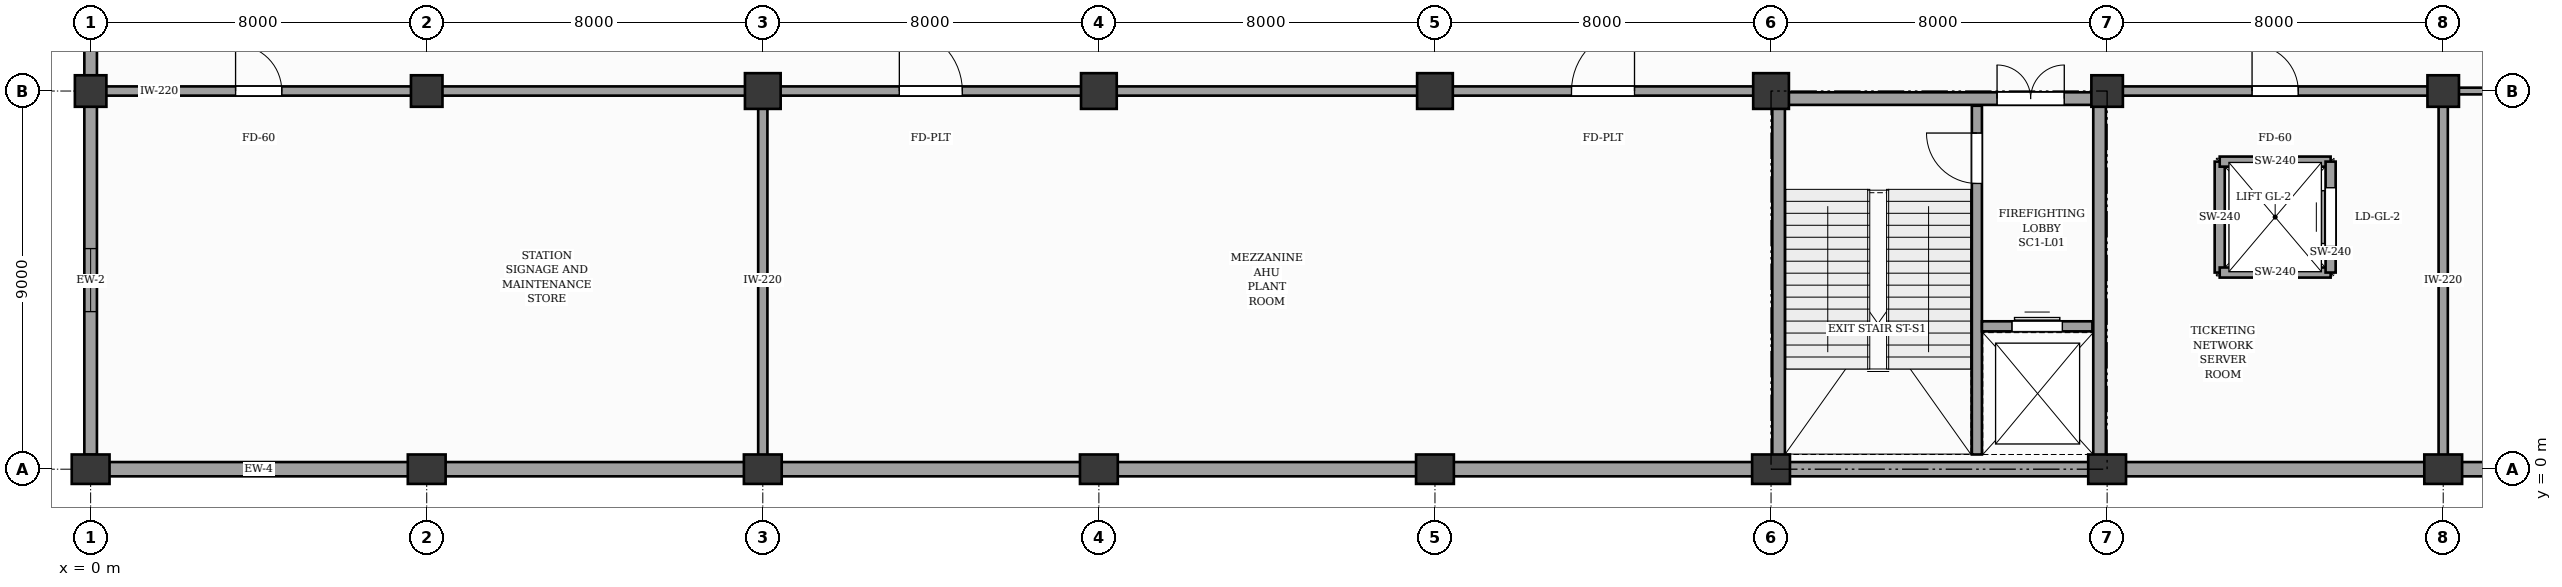
"""IFC4 building model, lengths in metres.
Left out: names, types, materials, properties, quantities, classifications, styles, units other than length and angle.
Written with IfcOpenShell. Run it as: python <this file> out.ifc"""

import sys

from ifc_helpers import new_model, si_unit, direction, frame, frame_2d, origin, origin_with_axes, origin_2d, place, context, subcontext, project, spatial, rectangle, extrude, element, fill, save


model = new_model("IFC4")
c1 = context("Model", 3, precision=1e-05, world=origin(), true_north=direction((0.0, 1.0)))
c2 = subcontext(c1, "Body", "Model", "MODEL_VIEW")
j1 = project(units=[si_unit("LENGTHUNIT", "METRE"), si_unit("PLANEANGLEUNIT", "RADIAN")], contexts=[c1])
p1 = place(None, origin())
s1 = spatial("IfcSite", under=j1, at=p1, CompositionType="ELEMENT")
p2 = place(p1, origin())
s2 = spatial("IfcBuilding", under=s1, at=p2, CompositionType="ELEMENT")
p3 = place(p2, frame((0.0, 0.0, 4.8)))
s3 = spatial("IfcBuildingStorey", under=s2, at=p3, CompositionType="ELEMENT", Elevation=4.8)
p4 = place(p3, origin_with_axes())
e1 = element("IfcColumn", 1, at=p4, inside=s3, PredefinedType="PILASTER", context=c2, shape_type="SweptSolid", body=[
    extrude(rectangle(XDim=0.9, YDim=0.7, at=origin_2d()), origin(), (0.0, 0.0, 1.0), 4.8),
])
p5 = place(p3, frame((0.0, 9.0, 0.0), z_axis=(0.0, 0.0, 1.0), x_axis=(1.0, 0.0, 0.0)))
e2 = element("IfcColumn", 2, at=p5, inside=s3, PredefinedType="COLUMN", context=c2, shape_type="SweptSolid", body=[
    extrude(rectangle(XDim=0.75, YDim=0.75, at=origin_2d()), origin(), (0.0, 0.0, 1.0), 4.8),
])
p6 = place(p3, frame((8.0, 0.0, 0.0), z_axis=(0.0, 0.0, 1.0), x_axis=(1.0, 0.0, 0.0)))
e3 = element("IfcColumn", 3, at=p6, inside=s3, PredefinedType="PILASTER", context=c2, shape_type="SweptSolid", body=[
    extrude(rectangle(XDim=0.9, YDim=0.7, at=origin_2d()), origin(), (0.0, 0.0, 1.0), 4.8),
])
p7 = place(p3, frame((8.0, 9.0, 0.0), z_axis=(0.0, 0.0, 1.0), x_axis=(1.0, 0.0, 0.0)))
e4 = element("IfcColumn", 4, at=p7, inside=s3, PredefinedType="COLUMN", context=c2, shape_type="SweptSolid", body=[
    extrude(rectangle(XDim=0.75, YDim=0.75, at=origin_2d()), origin(), (0.0, 0.0, 1.0), 4.8),
])
p8 = place(p3, frame((16.0, 0.0, 0.0), z_axis=(0.0, 0.0, 1.0), x_axis=(1.0, 0.0, 0.0)))
e5 = element("IfcColumn", 5, at=p8, inside=s3, PredefinedType="PILASTER", context=c2, shape_type="SweptSolid", body=[
    extrude(rectangle(XDim=0.9, YDim=0.7, at=origin_2d()), origin(), (0.0, 0.0, 1.0), 4.8),
])
p9 = place(p3, frame((16.0, 9.0, 0.0), z_axis=(0.0, 0.0, 1.0), x_axis=(1.0, 0.0, 0.0)))
e6 = element("IfcColumn", 6, at=p9, inside=s3, PredefinedType="COLUMN", context=c2, shape_type="SweptSolid", body=[
    extrude(rectangle(XDim=0.85, YDim=0.85, at=origin_2d()), origin(), (0.0, 0.0, 1.0), 4.8),
])
p10 = place(p3, frame((24.0, 0.0, 0.0), z_axis=(0.0, 0.0, 1.0), x_axis=(1.0, 0.0, 0.0)))
e7 = element("IfcColumn", 7, at=p10, inside=s3, PredefinedType="PILASTER", context=c2, shape_type="SweptSolid", body=[
    extrude(rectangle(XDim=0.9, YDim=0.7, at=origin_2d()), origin(), (0.0, 0.0, 1.0), 4.8),
])
p11 = place(p3, frame((24.0, 9.0, 0.0), z_axis=(0.0, 0.0, 1.0), x_axis=(1.0, 0.0, 0.0)))
e8 = element("IfcColumn", 8, at=p11, inside=s3, PredefinedType="COLUMN", context=c2, shape_type="SweptSolid", body=[
    extrude(rectangle(XDim=0.85, YDim=0.85, at=origin_2d()), origin(), (0.0, 0.0, 1.0), 4.8),
])
p12 = place(p3, frame((32.0, 0.0, 0.0), z_axis=(0.0, 0.0, 1.0), x_axis=(1.0, 0.0, 0.0)))
e9 = element("IfcColumn", 9, at=p12, inside=s3, PredefinedType="PILASTER", context=c2, shape_type="SweptSolid", body=[
    extrude(rectangle(XDim=0.9, YDim=0.7, at=origin_2d()), origin(), (0.0, 0.0, 1.0), 4.8),
])
p13 = place(p3, frame((32.0, 9.0, 0.0), z_axis=(0.0, 0.0, 1.0), x_axis=(1.0, 0.0, 0.0)))
e10 = element("IfcColumn", 10, at=p13, inside=s3, PredefinedType="COLUMN", context=c2, shape_type="SweptSolid", body=[
    extrude(rectangle(XDim=0.85, YDim=0.85, at=origin_2d()), origin(), (0.0, 0.0, 1.0), 4.8),
])
p14 = place(p3, frame((40.0, 0.0, 0.0), z_axis=(0.0, 0.0, 1.0), x_axis=(1.0, 0.0, 0.0)))
e11 = element("IfcColumn", 11, at=p14, inside=s3, PredefinedType="PILASTER", context=c2, shape_type="SweptSolid", body=[
    extrude(rectangle(XDim=0.9, YDim=0.7, at=origin_2d()), origin(), (0.0, 0.0, 1.0), 4.8),
])
p15 = place(p3, frame((40.0, 9.0, 0.0), z_axis=(0.0, 0.0, 1.0), x_axis=(1.0, 0.0, 0.0)))
e12 = element("IfcColumn", 12, at=p15, inside=s3, PredefinedType="COLUMN", context=c2, shape_type="SweptSolid", body=[
    extrude(rectangle(XDim=0.85, YDim=0.85, at=origin_2d()), origin(), (0.0, 0.0, 1.0), 4.8),
])
p16 = place(p3, frame((48.0, 0.0, 0.0), z_axis=(0.0, 0.0, 1.0), x_axis=(1.0, 0.0, 0.0)))
e13 = element("IfcColumn", 13, at=p16, inside=s3, PredefinedType="PILASTER", context=c2, shape_type="SweptSolid", body=[
    extrude(rectangle(XDim=0.9, YDim=0.7, at=origin_2d()), origin(), (0.0, 0.0, 1.0), 4.8),
])
p17 = place(p3, frame((48.0, 9.0, 0.0), z_axis=(0.0, 0.0, 1.0), x_axis=(1.0, 0.0, 0.0)))
e14 = element("IfcColumn", 14, at=p17, inside=s3, PredefinedType="COLUMN", context=c2, shape_type="SweptSolid", body=[
    extrude(rectangle(XDim=0.75, YDim=0.75, at=origin_2d()), origin(), (0.0, 0.0, 1.0), 4.8),
])
p18 = place(p3, frame((56.0, 0.0, 0.0), z_axis=(0.0, 0.0, 1.0), x_axis=(1.0, 0.0, 0.0)))
e15 = element("IfcColumn", 15, at=p18, inside=s3, PredefinedType="PILASTER", context=c2, shape_type="SweptSolid", body=[
    extrude(rectangle(XDim=0.9, YDim=0.7, at=origin_2d()), origin(), (0.0, 0.0, 1.0), 4.8),
])
p19 = place(p3, frame((56.0, 9.0, 0.0), z_axis=(0.0, 0.0, 1.0), x_axis=(1.0, 0.0, 0.0)))
e16 = element("IfcColumn", 16, at=p19, inside=s3, PredefinedType="COLUMN", context=c2, shape_type="SweptSolid", body=[
    extrude(rectangle(XDim=0.75, YDim=0.75, at=origin_2d()), origin(), (0.0, 0.0, 1.0), 4.8),
])
for number, where, z_axis, x_axis in (
    (17, (0.4, 0.0, 0.0), (0.0, 0.0, 1.0), (1.0, 0.0, 0.0)),
    (18, (8.4, 0.0, 0.0), (0.0, 0.0, 1.0), (1.0, 0.0, 0.0)),
    (19, (16.4, 0.0, 0.0), (0.0, 0.0, 1.0), (1.0, 0.0, 0.0)),
    (20, (24.4, 0.0, 0.0), (0.0, 0.0, 1.0), (1.0, 0.0, 0.0)),
    (21, (32.4, 0.0, 0.0), (0.0, 0.0, 1.0), (1.0, 0.0, 0.0)),
    (22, (40.4, 0.0, 0.0), (0.0, 0.0, 1.0), (1.0, 0.0, 0.0)),
    (23, (48.4, 0.0, 0.0), (0.0, 0.0, 1.0), (1.0, 0.0, 0.0)),
):
    element("IfcWall", number, at=place(p3, frame(where, z_axis=z_axis, x_axis=x_axis)), inside=s3, PredefinedType="SOLIDWALL", context=c2, shape_type="SweptSolid", body=[
        extrude(rectangle(XDim=7.2, YDim=0.34, at=frame_2d((3.6, 0.0))), origin(), (0.0, 0.0, 1.0), 3.84),
    ])
p20 = place(p3, frame((56.4, 0.0, 0.0), z_axis=(0.0, 0.0, 1.0), x_axis=(1.0, 0.0, 0.0)))
e24 = element("IfcWall", 24, at=p20, inside=s3, PredefinedType="SOLIDWALL", context=c2, shape_type="SweptSolid", body=[
    extrude(rectangle(XDim=7.2, YDim=0.34, at=frame_2d((3.6, 0.0))), origin(), (0.0, 0.0, 1.0), 3.08),
])
p21 = place(p3, frame((0.0, 0.345, 0.0), z_axis=(0.0, 0.0, 1.0), x_axis=(0.0, 1.0, 0.0)))
e25 = element("IfcWall", 25, at=p21, inside=s3, PredefinedType="SOLIDWALL", context=c2, shape_type="SweptSolid", body=[
    extrude(rectangle(XDim=8.285, YDim=0.3, at=frame_2d((4.143, 0.0))), origin(), (0.0, 0.0, 1.0), 3.66),
])
p22 = place(p21, frame((3.405, 0.0, 0.95)))
e26 = element("IfcOpeningElement", 26, at=p22, cuts=e25, PredefinedType="OPENING", context=c2, shape_type="SweptSolid", body=[
    extrude(rectangle(XDim=1.5, YDim=1.9, at=frame_2d((0.75, 0.95))), frame((0.0, 0.16, 0.0), z_axis=(0.0, -1.0, 0.0), x_axis=(1.0, 0.0, 0.0)), (0.0, 0.0, 1.0), 0.32),
])
p23 = place(p3, frame((0.0, 9.37, 0.0), z_axis=(0.0, 0.0, 1.0), x_axis=(0.0, 1.0, 0.0)))
e27 = element("IfcWall", 27, at=p23, inside=s3, PredefinedType="SOLIDWALL", context=c2, shape_type="SweptSolid", body=[
    extrude(rectangle(XDim=8.26, YDim=0.3, at=frame_2d((4.13, 0.0))), origin(), (0.0, 0.0, 1.0), 3.66),
])
p24 = place(p23, frame((3.38, 0.0, 0.95)))
e28 = element("IfcOpeningElement", 28, at=p24, cuts=e27, PredefinedType="OPENING", context=c2, shape_type="SweptSolid", body=[
    extrude(rectangle(XDim=1.5, YDim=1.9, at=frame_2d((0.75, 0.95))), frame((0.0, 0.16, 0.0), z_axis=(0.0, -1.0, 0.0), x_axis=(1.0, 0.0, 0.0)), (0.0, 0.0, 1.0), 0.32),
])
p25 = place(p3, frame((44.9, 0.35, 0.0), z_axis=(0.0, 0.0, 1.0), x_axis=(0.0, 1.0, 0.0)))
e29 = element("IfcWall", 29, at=p25, inside=s3, PredefinedType="SHEAR", context=c2, shape_type="SweptSolid", body=[
    extrude(rectangle(XDim=8.3, YDim=0.24, at=frame_2d((4.15, 0.0))), origin(), (0.0, 0.0, 1.0), 4.52),
])
p26 = place(p25, frame((6.45, 0.0, 0.0)))
e30 = element("IfcOpeningElement", 30, at=p26, cuts=e29, PredefinedType="OPENING", context=c2, shape_type="SweptSolid", body=[
    extrude(rectangle(XDim=1.2, YDim=2.15, at=frame_2d((0.6, 1.075))), frame((0.0, 0.13, 0.0), z_axis=(0.0, -1.0, 0.0), x_axis=(1.0, 0.0, 0.0)), (0.0, 0.0, 1.0), 0.26),
])
p27 = place(p3, frame((45.02, 3.4, 0.0), z_axis=(0.0, 0.0, 1.0), x_axis=(1.0, 0.0, 0.0)))
e31 = element("IfcWall", 31, at=p27, inside=s3, PredefinedType="SHEAR", context=c2, shape_type="SweptSolid", body=[
    extrude(rectangle(XDim=2.63, YDim=0.24, at=frame_2d((1.315, 0.0))), origin(), (0.0, 0.0, 1.0), 4.52),
])
p28 = place(p27, frame((0.715, 0.0, 0.0)))
e32 = element("IfcOpeningElement", 32, at=p28, cuts=e31, PredefinedType="OPENING", context=c2, shape_type="SweptSolid", body=[
    extrude(rectangle(XDim=1.2, YDim=2.15, at=frame_2d((0.6, 1.075))), frame((0.0, 0.13, 0.0), z_axis=(0.0, -1.0, 0.0), x_axis=(1.0, 0.0, 0.0)), (0.0, 0.0, 1.0), 0.26),
])
for number, where, z_axis, x_axis in (
    (33, (40.18, 0.18, 0.0), (0.0, 0.0, 1.0), (0.0, 1.0, 0.0)),
    (34, (47.82, 0.18, 0.0), (0.0, 0.0, 1.0), (0.0, 1.0, 0.0)),
):
    element("IfcWall", number, at=place(p3, frame(where, z_axis=z_axis, x_axis=x_axis)), inside=s3, PredefinedType="SHEAR", context=c2, shape_type="SweptSolid", body=[
        extrude(rectangle(XDim=8.64, YDim=0.3, at=frame_2d((4.32, 0.0))), origin(), (0.0, 0.0, 1.0), 4.52),
    ])
p29 = place(p3, frame((40.03, 8.82, 0.0), z_axis=(0.0, 0.0, 1.0), x_axis=(1.0, 0.0, 0.0)))
e35 = element("IfcWall", 35, at=p29, inside=s3, PredefinedType="SHEAR", context=c2, shape_type="SweptSolid", body=[
    extrude(rectangle(XDim=7.94, YDim=0.3, at=frame_2d((3.97, 0.0))), origin(), (0.0, 0.0, 1.0), 4.52),
])
p30 = place(p29, frame((5.35, 0.0, 0.0)))
e36 = element("IfcOpeningElement", 36, at=p30, cuts=e35, PredefinedType="OPENING", context=c2, shape_type="SweptSolid", body=[
    extrude(rectangle(XDim=1.6, YDim=2.15, at=frame_2d((0.8, 1.075))), frame((0.0, 0.16, 0.0), z_axis=(0.0, -1.0, 0.0), x_axis=(1.0, 0.0, 0.0)), (0.0, 0.0, 1.0), 0.32),
])
for number, where, z_axis, x_axis in (
    (37, (50.68, 4.68, 0.0), (0.0, 0.0, 1.0), (0.0, 1.0, 0.0)),
    (38, (50.68, 4.68, 0.0), (0.0, 0.0, 1.0), (1.0, 0.0, 0.0)),
    (39, (50.68, 7.32, 0.0), (0.0, 0.0, 1.0), (1.0, 0.0, 0.0)),
):
    element("IfcWall", number, at=place(p3, frame(where, z_axis=z_axis, x_axis=x_axis)), inside=s3, PredefinedType="SHEAR", context=c2, shape_type="SweptSolid", body=[
        extrude(rectangle(XDim=2.64, YDim=0.24, at=frame_2d((1.32, 0.0))), origin(), (0.0, 0.0, 1.0), 4.55),
    ])
p31 = place(p3, frame((53.32, 4.68, 0.0), z_axis=(0.0, 0.0, 1.0), x_axis=(0.0, 1.0, 0.0)))
e40 = element("IfcWall", 40, at=p31, inside=s3, PredefinedType="SHEAR", context=c2, shape_type="SweptSolid", body=[
    extrude(rectangle(XDim=2.64, YDim=0.24, at=frame_2d((1.32, 0.0))), origin(), (0.0, 0.0, 1.0), 4.55),
])
p32 = place(p31, frame((0.62, 0.0, 0.0)))
e41 = element("IfcOpeningElement", 41, at=p32, cuts=e40, PredefinedType="OPENING", context=c2, shape_type="SweptSolid", body=[
    extrude(rectangle(XDim=1.4, YDim=2.15, at=frame_2d((0.7, 1.075))), frame((0.0, 0.13, 0.0), z_axis=(0.0, -1.0, 0.0), x_axis=(1.0, 0.0, 0.0)), (0.0, 0.0, 1.0), 0.26),
])
p33 = place(p3, frame((0.3, 9.0, 0.0), z_axis=(0.0, 0.0, 1.0), x_axis=(1.0, 0.0, 0.0)))
e42 = element("IfcWall", 42, at=p33, inside=s3, PredefinedType="SOLIDWALL", context=c2, shape_type="SweptSolid", body=[
    extrude(rectangle(XDim=7.4, YDim=0.22, at=frame_2d((3.7, 0.0))), origin(), (0.0, 0.0, 1.0), 3.66),
])
p34 = place(p33, frame((3.15, 0.0, 0.0)))
e43 = element("IfcOpeningElement", 43, at=p34, cuts=e42, PredefinedType="OPENING", context=c2, shape_type="SweptSolid", body=[
    extrude(rectangle(XDim=1.1, YDim=2.15, at=frame_2d((0.55, 1.075))), frame((0.0, 0.12, 0.0), z_axis=(0.0, -1.0, 0.0), x_axis=(1.0, 0.0, 0.0)), (0.0, 0.0, 1.0), 0.24),
])
p35 = place(p3, frame((8.3, 9.0, 0.0), z_axis=(0.0, 0.0, 1.0), x_axis=(1.0, 0.0, 0.0)))
e44 = element("IfcWall", 44, at=p35, inside=s3, PredefinedType="SOLIDWALL", context=c2, shape_type="SweptSolid", body=[
    extrude(rectangle(XDim=7.4, YDim=0.22, at=frame_2d((3.7, 0.0))), origin(), (0.0, 0.0, 1.0), 3.66),
])
p36 = place(p3, frame((16.0, 0.3, 0.0), z_axis=(0.0, 0.0, 1.0), x_axis=(0.0, 1.0, 0.0)))
e45 = element("IfcWall", 45, at=p36, inside=s3, PredefinedType="SOLIDWALL", context=c2, shape_type="SweptSolid", body=[
    extrude(rectangle(XDim=8.4, YDim=0.22, at=frame_2d((4.2, 0.0))), origin(), (0.0, 0.0, 1.0), 3.66),
])
p37 = place(p3, frame((16.3, 9.0, 0.0), z_axis=(0.0, 0.0, 1.0), x_axis=(1.0, 0.0, 0.0)))
e46 = element("IfcWall", 46, at=p37, inside=s3, PredefinedType="SOLIDWALL", context=c2, shape_type="SweptSolid", body=[
    extrude(rectangle(XDim=7.4, YDim=0.22, at=frame_2d((3.7, 0.0))), origin(), (0.0, 0.0, 1.0), 3.66),
])
p38 = place(p37, frame((2.95, 0.0, 0.0)))
e47 = element("IfcOpeningElement", 47, at=p38, cuts=e46, PredefinedType="OPENING", context=c2, shape_type="SweptSolid", body=[
    extrude(rectangle(XDim=1.5, YDim=2.2, at=frame_2d((0.75, 1.1))), frame((0.0, 0.12, 0.0), z_axis=(0.0, -1.0, 0.0), x_axis=(1.0, 0.0, 0.0)), (0.0, 0.0, 1.0), 0.24),
])
p39 = place(p3, frame((24.3, 9.0, 0.0), z_axis=(0.0, 0.0, 1.0), x_axis=(1.0, 0.0, 0.0)))
e48 = element("IfcWall", 48, at=p39, inside=s3, PredefinedType="SOLIDWALL", context=c2, shape_type="SweptSolid", body=[
    extrude(rectangle(XDim=7.4, YDim=0.22, at=frame_2d((3.7, 0.0))), origin(), (0.0, 0.0, 1.0), 3.66),
])
p40 = place(p3, frame((32.3, 9.0, 0.0), z_axis=(0.0, 0.0, 1.0), x_axis=(1.0, 0.0, 0.0)))
e49 = element("IfcWall", 49, at=p40, inside=s3, PredefinedType="SOLIDWALL", context=c2, shape_type="SweptSolid", body=[
    extrude(rectangle(XDim=7.4, YDim=0.22, at=frame_2d((3.7, 0.0))), origin(), (0.0, 0.0, 1.0), 3.66),
])
p41 = place(p40, frame((2.95, 0.0, 0.0)))
e50 = element("IfcOpeningElement", 50, at=p41, cuts=e49, PredefinedType="OPENING", context=c2, shape_type="SweptSolid", body=[
    extrude(rectangle(XDim=1.5, YDim=2.2, at=frame_2d((0.75, 1.1))), frame((0.0, 0.12, 0.0), z_axis=(0.0, -1.0, 0.0), x_axis=(1.0, 0.0, 0.0)), (0.0, 0.0, 1.0), 0.24),
])
p42 = place(p3, frame((48.3, 9.0, 0.0), z_axis=(0.0, 0.0, 1.0), x_axis=(1.0, 0.0, 0.0)))
e51 = element("IfcWall", 51, at=p42, inside=s3, PredefinedType="SOLIDWALL", context=c2, shape_type="SweptSolid", body=[
    extrude(rectangle(XDim=7.4, YDim=0.22, at=frame_2d((3.7, 0.0))), origin(), (0.0, 0.0, 1.0), 3.66),
])
p43 = place(p42, frame((3.15, 0.0, 0.0)))
e52 = element("IfcOpeningElement", 52, at=p43, cuts=e51, PredefinedType="OPENING", context=c2, shape_type="SweptSolid", body=[
    extrude(rectangle(XDim=1.1, YDim=2.15, at=frame_2d((0.55, 1.075))), frame((0.0, 0.12, 0.0), z_axis=(0.0, -1.0, 0.0), x_axis=(1.0, 0.0, 0.0)), (0.0, 0.0, 1.0), 0.24),
])
p44 = place(p3, frame((56.0, 0.3, 0.0), z_axis=(0.0, 0.0, 1.0), x_axis=(0.0, 1.0, 0.0)))
e53 = element("IfcWall", 53, at=p44, inside=s3, PredefinedType="SOLIDWALL", context=c2, shape_type="SweptSolid", body=[
    extrude(rectangle(XDim=8.4, YDim=0.22, at=frame_2d((4.2, 0.0))), origin(), (0.0, 0.0, 1.0), 3.66),
])
p45 = place(p3, frame((56.3, 9.0, 0.0), z_axis=(0.0, 0.0, 1.0), x_axis=(1.0, 0.0, 0.0)))
e54 = element("IfcWall", 54, at=p45, inside=s3, PredefinedType="PARTITIONING", context=c2, shape_type="SweptSolid", body=[
    extrude(rectangle(XDim=7.4, YDim=0.16, at=frame_2d((3.7, 0.0))), origin(), (0.0, 0.0, 1.0), 2.83),
])
p46 = place(p45, frame((3.2, 0.0, 0.0)))
e55 = element("IfcOpeningElement", 55, at=p46, cuts=e54, PredefinedType="OPENING", context=c2, shape_type="SweptSolid", body=[
    extrude(rectangle(XDim=1.0, YDim=2.1, at=frame_2d((0.5, 1.05))), frame((0.0, 0.09, 0.0), z_axis=(0.0, -1.0, 0.0), x_axis=(1.0, 0.0, 0.0)), (0.0, 0.0, 1.0), 0.18),
])
p47 = place(p22, origin())
e56 = element("IfcWindow", 56, at=p47, inside=s3, PartitioningType="SINGLE_PANEL", PredefinedType="WINDOW", context=c2, shape_type="SweptSolid", body=[
    extrude(rectangle(XDim=1.5, YDim=1.9, at=frame_2d((0.75, 0.95))), frame((0.0, 0.03, 0.0), z_axis=(0.0, -1.0, 0.0), x_axis=(1.0, 0.0, 0.0)), (0.0, 0.0, 1.0), 0.06),
])
fill(e26, e56)
p48 = place(p26, origin())
e57 = element("IfcDoor", 57, at=p48, inside=s3, OperationType="SINGLE_SWING_RIGHT", PredefinedType="DOOR", context=c2, shape_type="SweptSolid", body=[
    extrude(rectangle(XDim=1.2, YDim=2.15, at=frame_2d((0.6, 1.075))), frame((0.0, 0.025, 0.0), z_axis=(0.0, -1.0, 0.0), x_axis=(1.0, 0.0, 0.0)), (0.0, 0.0, 1.0), 0.05),
])
fill(e30, e57)
p49 = place(p28, origin())
e58 = element("IfcDoor", 58, at=p49, inside=s3, OperationType="DOUBLE_DOOR_SLIDING", PredefinedType="DOOR", context=c2, shape_type="SweptSolid", body=[
    extrude(rectangle(XDim=1.2, YDim=2.15, at=frame_2d((0.6, 1.075))), frame((0.0, 0.025, 0.0), z_axis=(0.0, -1.0, 0.0), x_axis=(1.0, 0.0, 0.0)), (0.0, 0.0, 1.0), 0.05),
])
fill(e32, e58)
p50 = place(p30, origin())
e59 = element("IfcDoor", 59, at=p50, inside=s3, OperationType="DOUBLE_DOOR_SINGLE_SWING", PredefinedType="DOOR", context=c2, shape_type="SweptSolid", body=[
    extrude(rectangle(XDim=1.6, YDim=2.15, at=frame_2d((0.8, 1.075))), frame((0.0, 0.025, 0.0), z_axis=(0.0, -1.0, 0.0), x_axis=(1.0, 0.0, 0.0)), (0.0, 0.0, 1.0), 0.05),
])
fill(e36, e59)
p51 = place(p32, origin())
e60 = element("IfcDoor", 60, at=p51, inside=s3, OperationType="DOUBLE_DOOR_SLIDING", PredefinedType="DOOR", context=c2, shape_type="SweptSolid", body=[
    extrude(rectangle(XDim=1.4, YDim=2.15, at=frame_2d((0.7, 1.075))), frame((0.0, 0.025, 0.0), z_axis=(0.0, -1.0, 0.0), x_axis=(1.0, 0.0, 0.0)), (0.0, 0.0, 1.0), 0.05),
])
fill(e41, e60)
p52 = place(p34, origin())
e61 = element("IfcDoor", 61, at=p52, inside=s3, OperationType="SINGLE_SWING_LEFT", PredefinedType="DOOR", context=c2, shape_type="SweptSolid", body=[
    extrude(rectangle(XDim=1.1, YDim=2.15, at=frame_2d((0.55, 1.075))), frame((0.0, 0.025, 0.0), z_axis=(0.0, -1.0, 0.0), x_axis=(1.0, 0.0, 0.0)), (0.0, 0.0, 1.0), 0.05),
])
fill(e43, e61)
p53 = place(p38, origin())
e62 = element("IfcDoor", 62, at=p53, inside=s3, OperationType="SINGLE_SWING_LEFT", PredefinedType="DOOR", context=c2, shape_type="SweptSolid", body=[
    extrude(rectangle(XDim=1.5, YDim=2.2, at=frame_2d((0.75, 1.1))), frame((0.0, 0.025, 0.0), z_axis=(0.0, -1.0, 0.0), x_axis=(1.0, 0.0, 0.0)), (0.0, 0.0, 1.0), 0.05),
])
fill(e47, e62)
p54 = place(p41, origin())
e63 = element("IfcDoor", 63, at=p54, inside=s3, OperationType="SINGLE_SWING_RIGHT", PredefinedType="DOOR", context=c2, shape_type="SweptSolid", body=[
    extrude(rectangle(XDim=1.5, YDim=2.2, at=frame_2d((0.75, 1.1))), frame((0.0, 0.025, 0.0), z_axis=(0.0, -1.0, 0.0), x_axis=(1.0, 0.0, 0.0)), (0.0, 0.0, 1.0), 0.05),
])
fill(e50, e63)
p55 = place(p43, origin())
e64 = element("IfcDoor", 64, at=p55, inside=s3, OperationType="SINGLE_SWING_LEFT", PredefinedType="DOOR", context=c2, shape_type="SweptSolid", body=[
    extrude(rectangle(XDim=1.1, YDim=2.15, at=frame_2d((0.55, 1.075))), frame((0.0, 0.025, 0.0), z_axis=(0.0, -1.0, 0.0), x_axis=(1.0, 0.0, 0.0)), (0.0, 0.0, 1.0), 0.05),
])
fill(e52, e64)
save(model, sys.argv[1])
